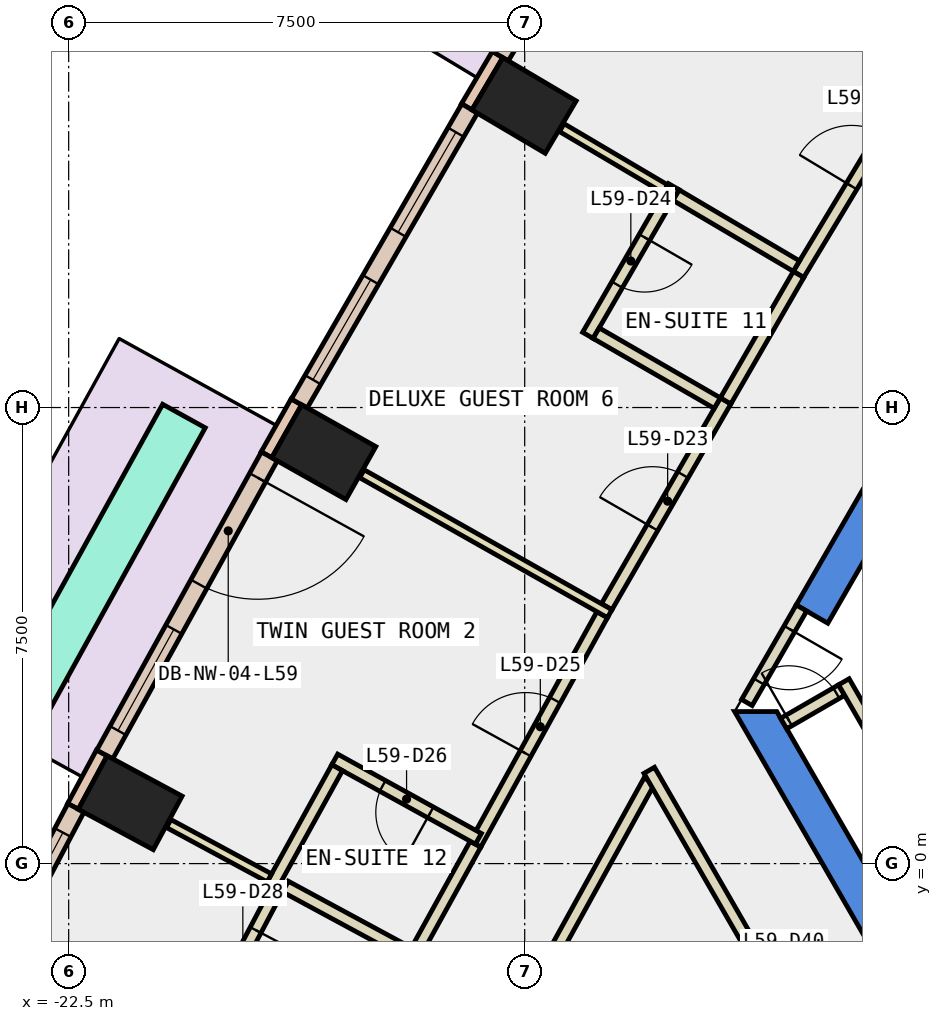
"""IFC4 building model, lengths in metres.
Left out: names, types, materials, properties, quantities, classifications, styles, units other than length and angle.
Written with IfcOpenShell. Run it as: python <this file> out.ifc"""

import sys

from ifc_helpers import new_model, si_unit, direction, frame, frame_2d, origin, origin_2d, place, context, subcontext, project, spatial, polyline, rectangle, outline, extrude, element, fill, save


model = new_model("IFC4")
c1 = context("Model", 3, precision=1e-05, world=origin(), true_north=direction((0.0, 1.0)))
c2 = subcontext(c1, "Body", "Model", "MODEL_VIEW")
j1 = project(units=[si_unit("LENGTHUNIT", "METRE"), si_unit("PLANEANGLEUNIT", "RADIAN")], contexts=[c1])
p1 = place(None, origin())
s1 = spatial("IfcSite", under=j1, at=p1, CompositionType="ELEMENT")
p2 = place(p1, origin())
s2 = spatial("IfcBuilding", under=s1, at=p2, CompositionType="ELEMENT")
p3 = place(p2, frame((0.0, 0.0, 259.4)))
s3 = spatial("IfcBuildingStorey", under=s2, at=p3, CompositionType="ELEMENT", Elevation=259.4)
for number, where, z_axis, x_axis in (
    (1, (-15.011, 12.468, -0.34), (0.0, 0.0, 1.0), (0.509, 0.861, 0.0)),
    (2, (-18.304, 6.766, -0.34), (0.0, 0.0, 1.0), (0.491, 0.871, 0.0)),
    (3, (-21.488, 1.001, -0.34), (0.0, 0.0, 1.0), (0.474, 0.881, 0.0)),
):
    element("IfcColumn", number, at=place(p3, frame(where, z_axis=z_axis, x_axis=x_axis)), inside=s3, PredefinedType="COLUMN", context=c2, shape_type="SweptSolid", body=[
        extrude(rectangle(XDim=1.0, YDim=1.4, at=origin_2d()), origin(), (0.0, 0.0, 1.0), 3.6),
    ])
p4 = place(p3, frame((0.0, 0.0, -0.34)))
e4 = element("IfcWall", 4, at=p4, inside=s3, PredefinedType="SHEAR", context=c2, shape_type="SweptSolid", body=[
    extrude(outline(polyline([(-10.535, 4.253), (-10.015, 3.953), (-5.427, 11.9), (-5.774, 12.5), (-10.535, 4.253)])), origin(), (0.0, 0.0, 1.0), 3.6),
])
p5 = place(p3, frame((0.0, 0.0, -0.34)))
e5 = element("IfcWall", 5, at=p5, inside=s3, PredefinedType="SHEAR", context=c2, shape_type="SweptSolid", body=[
    extrude(outline(polyline([(-11.547, 2.5), (-5.774, -7.5), (-5.427, -6.9), (-10.854, 2.5), (-11.547, 2.5)])), origin(), (0.0, 0.0, 1.0), 3.6),
])
p6 = place(p3, frame((-15.446, 13.306, 0.0), z_axis=(0.0, 0.0, 1.0), x_axis=(-0.508268432768, -0.861198699634, 0.0)))
e6 = element("IfcWall", 6, at=p6, inside=s3, PredefinedType="STANDARD", context=c2, shape_type="SweptSolid", body=[
    extrude(rectangle(XDim=1.0, YDim=0.2, at=frame_2d((0.5, 0.0))), origin(), (0.0, 0.0, 1.0), 3.26),
])
for number, where, z_axis, x_axis in (
    (7, (-18.755, 7.594, 0.0), (0.0, 0.0, 1.0), (-0.492, -0.871, 0.0)),
    (8, (-21.955, 1.821, 0.0), (0.0, 0.0, 1.0), (-0.474, -0.881, 0.0)),
):
    element("IfcWall", number, at=place(p3, frame(where, z_axis=z_axis, x_axis=x_axis)), inside=s3, PredefinedType="STANDARD", context=c2, shape_type="SweptSolid", body=[
        extrude(rectangle(XDim=1.0, YDim=0.2, at=frame_2d((0.5, 0.0))), origin(), (0.0, 0.0, 1.0), 3.26),
    ])
p7 = place(p3, frame((-12.506, 18.076, 0.0), z_axis=(0.0, 0.0, 1.0), x_axis=(-0.516269519619, -0.856426169096, 0.0)))
e9 = element("IfcWall", 9, at=p7, inside=s3, PredefinedType="STANDARD", context=c2, shape_type="SweptSolid", body=[
    extrude(rectangle(XDim=5.603, YDim=0.3, at=frame_2d((2.802, 0.0))), origin(), (0.0, 0.0, 1.0), 3.26),
])
p8 = place(p7, frame((0.401, 0.0, 0.0)))
e10 = element("IfcOpeningElement", 10, at=p8, cuts=e9, PredefinedType="OPENING", context=c2, shape_type="SweptSolid", body=[
    extrude(rectangle(XDim=2.0, YDim=2.4, at=frame_2d((1.0, 1.2))), frame((0.0, 0.16, 0.0), z_axis=(0.0, -1.0, 0.0), x_axis=(1.0, 0.0, 0.0)), (0.0, 0.0, 1.0), 0.32),
])
p9 = place(p7, frame((3.253, 0.0, 0.9)))
e11 = element("IfcOpeningElement", 11, at=p9, cuts=e9, PredefinedType="OPENING", context=c2, shape_type="SweptSolid", body=[
    extrude(rectangle(XDim=1.9, YDim=2.0, at=frame_2d((0.95, 1.0))), frame((0.0, 0.16, 0.0), z_axis=(0.0, -1.0, 0.0), x_axis=(1.0, 0.0, 0.0)), (0.0, 0.0, 1.0), 0.32),
])
p10 = place(p3, frame((-15.906, 12.418, 0.0), z_axis=(0.0, 0.0, 1.0), x_axis=(-0.500089564757, -0.865973687372, 0.0)))
e12 = element("IfcWall", 12, at=p10, inside=s3, PredefinedType="STANDARD", context=c2, shape_type="SweptSolid", body=[
    extrude(rectangle(XDim=5.603, YDim=0.3, at=frame_2d((2.802, 0.0))), origin(), (0.0, 0.0, 1.0), 3.26),
])
p11 = place(p10, frame((0.451, 0.0, 0.9)))
e13 = element("IfcOpeningElement", 13, at=p11, cuts=e12, PredefinedType="OPENING", context=c2, shape_type="SweptSolid", body=[
    extrude(rectangle(XDim=1.9, YDim=2.0, at=frame_2d((0.95, 1.0))), frame((0.0, 0.16, 0.0), z_axis=(0.0, -1.0, 0.0), x_axis=(1.0, 0.0, 0.0)), (0.0, 0.0, 1.0), 0.32),
])
p12 = place(p10, frame((3.252, 0.0, 0.9)))
e14 = element("IfcOpeningElement", 14, at=p12, cuts=e12, PredefinedType="OPENING", context=c2, shape_type="SweptSolid", body=[
    extrude(rectangle(XDim=1.9, YDim=2.0, at=frame_2d((0.95, 1.0))), frame((0.0, 0.16, 0.0), z_axis=(0.0, -1.0, 0.0), x_axis=(1.0, 0.0, 0.0)), (0.0, 0.0, 1.0), 0.32),
])
p13 = place(p3, frame((-19.199, 6.697, 0.0), z_axis=(0.0, 0.0, 1.0), x_axis=(-0.483469062695, -0.875361448441, 0.0)))
e15 = element("IfcWall", 15, at=p13, inside=s3, PredefinedType="STANDARD", context=c2, shape_type="SweptSolid", body=[
    extrude(rectangle(XDim=5.601, YDim=0.3, at=frame_2d((2.801, 0.0))), origin(), (0.0, 0.0, 1.0), 3.26),
])
p14 = place(p13, frame((0.4, 0.0, 0.0)))
e16 = element("IfcOpeningElement", 16, at=p14, cuts=e15, PredefinedType="OPENING", context=c2, shape_type="SweptSolid", body=[
    extrude(rectangle(XDim=2.0, YDim=2.4, at=frame_2d((1.0, 1.2))), frame((0.0, 0.16, 0.0), z_axis=(0.0, -1.0, 0.0), x_axis=(1.0, 0.0, 0.0)), (0.0, 0.0, 1.0), 0.32),
])
p15 = place(p13, frame((3.251, 0.0, 0.9)))
e17 = element("IfcOpeningElement", 17, at=p15, cuts=e15, PredefinedType="OPENING", context=c2, shape_type="SweptSolid", body=[
    extrude(rectangle(XDim=1.9, YDim=2.0, at=frame_2d((0.95, 1.0))), frame((0.0, 0.16, 0.0), z_axis=(0.0, -1.0, 0.0), x_axis=(1.0, 0.0, 0.0)), (0.0, 0.0, 1.0), 0.32),
])
p16 = place(p3, frame((-22.381, 0.916, 0.0), z_axis=(0.0, 0.0, 1.0), x_axis=(-0.466663589714, -0.884434900959, 0.0)))
e18 = element("IfcWall", 18, at=p16, inside=s3, PredefinedType="STANDARD", context=c2, shape_type="SweptSolid", body=[
    extrude(rectangle(XDim=5.638, YDim=0.3, at=frame_2d((2.819, 0.0))), origin(), (0.0, 0.0, 1.0), 3.26),
])
p17 = place(p16, frame((0.459, 0.0, 0.9)))
e19 = element("IfcOpeningElement", 19, at=p17, cuts=e18, PredefinedType="OPENING", context=c2, shape_type="SweptSolid", body=[
    extrude(rectangle(XDim=1.9, YDim=2.0, at=frame_2d((0.95, 1.0))), frame((0.0, 0.16, 0.0), z_axis=(0.0, -1.0, 0.0), x_axis=(1.0, 0.0, 0.0)), (0.0, 0.0, 1.0), 0.32),
])
p18 = place(p16, frame((3.278, 0.0, 0.9)))
e20 = element("IfcOpeningElement", 20, at=p18, cuts=e18, PredefinedType="OPENING", context=c2, shape_type="SweptSolid", body=[
    extrude(rectangle(XDim=1.9, YDim=2.0, at=frame_2d((0.95, 1.0))), frame((0.0, 0.16, 0.0), z_axis=(0.0, -1.0, 0.0), x_axis=(1.0, 0.0, 0.0)), (0.0, 0.0, 1.0), 0.32),
])
p19 = place(p3, frame((-20.604, 7.36, 0.0), z_axis=(0.0, 0.0, 1.0), x_axis=(-0.483262482812, -0.87547551234, 0.0)))
e21 = element("IfcWall", 21, at=p19, inside=s3, PredefinedType="STANDARD", context=c2, shape_type="SweptSolid", body=[
    extrude(rectangle(XDim=5.403, YDim=0.8, at=frame_2d((2.702, 0.0))), origin(), (0.0, 0.0, 1.0), 0.8),
])
p20 = place(p3, frame((-12.95, 1.36, 0.0), z_axis=(0.0, 0.0, 1.0), x_axis=(-0.483418231124, -0.875389521194, 0.0)))
e22 = element("IfcWall", 22, at=p20, inside=s3, PredefinedType="PARTITIONING", context=c2, shape_type="SweptSolid", body=[
    extrude(rectangle(XDim=4.373, YDim=0.2, at=frame_2d((2.187, 0.0))), origin(), (0.0, 0.0, 1.0), 3.26),
])
p21 = place(p3, frame((-10.498, 9.689, 0.0), z_axis=(0.0, 0.0, 1.0), x_axis=(0.516353342298, 0.856375633643, 0.0)))
e23 = element("IfcWall", 23, at=p21, inside=s3, PredefinedType="PARTITIONING", context=c2, shape_type="SweptSolid", body=[
    extrude(rectangle(XDim=4.288, YDim=0.2, at=frame_2d((2.144, 0.0))), origin(), (0.0, 0.0, 1.0), 3.26),
])
p22 = place(p21, frame((1.694, 0.0, 0.0)))
e24 = element("IfcOpeningElement", 24, at=p22, cuts=e23, PredefinedType="OPENING", context=c2, shape_type="SweptSolid", body=[
    extrude(rectangle(XDim=1.0, YDim=2.1, at=frame_2d((0.5, 1.05))), frame((0.0, 0.11, 0.0), z_axis=(0.0, -1.0, 0.0), x_axis=(1.0, 0.0, 0.0)), (0.0, 0.0, 1.0), 0.22),
])
p23 = place(p3, frame((-13.652, 4.224, 0.0), z_axis=(0.0, 0.0, 1.0), x_axis=(0.500221427001, 0.865897525097, 0.0)))
e25 = element("IfcWall", 25, at=p23, inside=s3, PredefinedType="PARTITIONING", context=c2, shape_type="SweptSolid", body=[
    extrude(rectangle(XDim=3.91, YDim=0.2, at=frame_2d((1.955, 0.0))), origin(), (0.0, 0.0, 1.0), 3.26),
])
p24 = place(p23, frame((1.505, 0.0, 0.0)))
e26 = element("IfcOpeningElement", 26, at=p24, cuts=e25, PredefinedType="OPENING", context=c2, shape_type="SweptSolid", body=[
    extrude(rectangle(XDim=1.0, YDim=2.1, at=frame_2d((0.5, 1.05))), frame((0.0, 0.11, 0.0), z_axis=(0.0, -1.0, 0.0), x_axis=(1.0, 0.0, 0.0)), (0.0, 0.0, 1.0), 0.22),
])
p25 = place(p3, frame((-11.696, 7.61, 0.0), z_axis=(0.0, 0.0, 1.0), x_axis=(0.500089422704, 0.865973769406, 0.0)))
e27 = element("IfcWall", 27, at=p25, inside=s3, PredefinedType="PARTITIONING", context=c2, shape_type="SweptSolid", body=[
    extrude(rectangle(XDim=2.399, YDim=0.2, at=frame_2d((1.2, 0.0))), origin(), (0.0, 0.0, 1.0), 3.26),
])
p26 = place(p3, frame((-15.809, 0.32, 0.0), z_axis=(0.0, 0.0, 1.0), x_axis=(0.483322920175, 0.875442148193, 0.0)))
e28 = element("IfcWall", 28, at=p26, inside=s3, PredefinedType="PARTITIONING", context=c2, shape_type="SweptSolid", body=[
    extrude(rectangle(XDim=4.31, YDim=0.2, at=frame_2d((2.155, 0.0))), origin(), (0.0, 0.0, 1.0), 3.26),
])
p27 = place(p26, frame((1.705, 0.0, 0.0)))
e29 = element("IfcOpeningElement", 29, at=p27, cuts=e28, PredefinedType="OPENING", context=c2, shape_type="SweptSolid", body=[
    extrude(rectangle(XDim=1.0, YDim=2.1, at=frame_2d((0.5, 1.05))), frame((0.0, 0.11, 0.0), z_axis=(0.0, -1.0, 0.0), x_axis=(1.0, 0.0, 0.0)), (0.0, 0.0, 1.0), 0.22),
])
p28 = place(p3, frame((-16.776, -1.43, 0.0), z_axis=(0.0, 0.0, 1.0), x_axis=(0.48360724937, 0.87528511261, 0.0)))
e30 = element("IfcWall", 30, at=p28, inside=s3, PredefinedType="PARTITIONING", context=c2, shape_type="SweptSolid", body=[
    extrude(rectangle(XDim=1.997, YDim=0.2, at=frame_2d((0.999, 0.0))), origin(), (0.0, 0.0, 1.0), 3.26),
])
p29 = place(p3, frame((-10.741, 2.303, 0.0), z_axis=(0.0, 0.0, 1.0), x_axis=(0.866063652425, 0.499933745558, 0.0)))
e31 = element("IfcWall", 31, at=p29, inside=s3, PredefinedType="PARTITIONING", context=c2, shape_type="SweptSolid", body=[
    extrude(rectangle(XDim=1.1, YDim=0.2, at=frame_2d((0.55, 0.0))), origin(), (0.0, 0.0, 1.0), 3.26),
])
p30 = place(p29, frame((0.1, 0.0, 0.0)))
e32 = element("IfcOpeningElement", 32, at=p30, cuts=e31, PredefinedType="OPENING", context=c2, shape_type="SweptSolid", body=[
    extrude(rectangle(XDim=0.9, YDim=2.1, at=frame_2d((0.45, 1.05))), frame((0.0, 0.11, 0.0), z_axis=(0.0, -1.0, 0.0), x_axis=(1.0, 0.0, 0.0)), (0.0, 0.0, 1.0), 0.22),
])
p31 = place(p3, frame((-9.751, 2.99, 0.0), z_axis=(0.0, 0.0, 1.0), x_axis=(0.499955951776, -0.866050833545, 0.0)))
e33 = element("IfcWall", 33, at=p31, inside=s3, PredefinedType="PARTITIONING", context=c2, shape_type="SweptSolid", body=[
    extrude(rectangle(XDim=5.4, YDim=0.2, at=frame_2d((2.7, 0.0))), origin(), (0.0, 0.0, 1.0), 3.26),
])
p32 = place(p3, frame((-10.306, 14.463, 0.0), z_axis=(0.0, 0.0, 1.0), x_axis=(0.856338986581, -0.51641411683, 0.0)))
e34 = element("IfcWall", 34, at=p32, inside=s3, PredefinedType="PARTITIONING", context=c2, shape_type="SweptSolid", body=[
    extrude(rectangle(XDim=2.301, YDim=0.2, at=frame_2d((1.15, 0.0))), origin(), (0.0, 0.0, 1.0), 3.26),
])
p33 = place(p3, frame((-12.685, 11.096, 0.0), z_axis=(0.0, 0.0, 1.0), x_axis=(-0.861157054724, 0.508338988371, 0.0)))
e35 = element("IfcWall", 35, at=p33, inside=s3, PredefinedType="PARTITIONING", context=c2, shape_type="SweptSolid", body=[
    extrude(rectangle(XDim=1.981, YDim=0.15, at=frame_2d((0.991, 0.0))), origin(), (0.0, 0.0, 1.0), 3.26),
])
p34 = place(p3, frame((-10.532, 9.826, 0.0), z_axis=(0.0, 0.0, 1.0), x_axis=(-0.861311086958, 0.508077958077, 0.0)))
e36 = element("IfcWall", 36, at=p34, inside=s3, PredefinedType="PARTITIONING", context=c2, shape_type="SweptSolid", body=[
    extrude(rectangle(XDim=2.299, YDim=0.2, at=frame_2d((1.149, 0.0))), origin(), (0.0, 0.0, 1.0), 3.26),
])
p35 = place(p3, frame((-12.548, 11.132, 0.0), z_axis=(0.0, 0.0, 1.0), x_axis=(-0.500313606915, -0.865844267022, 0.0)))
e37 = element("IfcWall", 37, at=p35, inside=s3, PredefinedType="PARTITIONING", context=c2, shape_type="SweptSolid", body=[
    extrude(rectangle(XDim=2.824, YDim=0.2, at=frame_2d((1.412, 0.0))), origin(), (0.0, 0.0, 1.0), 3.26),
])
p36 = place(p35, frame((0.962, 0.0, 0.0)))
e38 = element("IfcOpeningElement", 38, at=p36, cuts=e37, PredefinedType="OPENING", context=c2, shape_type="SweptSolid", body=[
    extrude(rectangle(XDim=0.9, YDim=2.1, at=frame_2d((0.45, 1.05))), frame((0.0, 0.11, 0.0), z_axis=(0.0, -1.0, 0.0), x_axis=(1.0, 0.0, 0.0)), (0.0, 0.0, 1.0), 0.22),
])
p37 = place(p3, frame((-13.825, 8.723, 0.0), z_axis=(0.0, 0.0, 1.0), x_axis=(0.866053019151, -0.499952165731, 0.0)))
e39 = element("IfcWall", 39, at=p37, inside=s3, PredefinedType="PARTITIONING", context=c2, shape_type="SweptSolid", body=[
    extrude(rectangle(XDim=2.3, YDim=0.2, at=frame_2d((1.15, 0.0))), origin(), (0.0, 0.0, 1.0), 3.26),
])
p38 = place(p3, frame((-13.602, 4.11, 0.0), z_axis=(0.0, 0.0, 1.0), x_axis=(-0.870787203306, 0.491660092502, 0.0)))
e40 = element("IfcWall", 40, at=p38, inside=s3, PredefinedType="PARTITIONING", context=c2, shape_type="SweptSolid", body=[
    extrude(rectangle(XDim=4.68, YDim=0.15, at=frame_2d((2.34, 0.0))), origin(), (0.0, 0.0, 1.0), 3.26),
])
p39 = place(p3, frame((-15.761, 0.408, 0.0), z_axis=(0.0, 0.0, 1.0), x_axis=(-0.875391622802, 0.483414425445, 0.0)))
e41 = element("IfcWall", 41, at=p39, inside=s3, PredefinedType="PARTITIONING", context=c2, shape_type="SweptSolid", body=[
    extrude(rectangle(XDim=2.699, YDim=0.2, at=frame_2d((1.35, 0.0))), origin(), (0.0, 0.0, 1.0), 3.26),
])
p40 = place(p39, frame((0.9, 0.0, 0.0)))
e42 = element("IfcOpeningElement", 42, at=p40, cuts=e41, PredefinedType="OPENING", context=c2, shape_type="SweptSolid", body=[
    extrude(rectangle(XDim=0.9, YDim=2.1, at=frame_2d((0.45, 1.05))), frame((0.0, 0.11, 0.0), z_axis=(0.0, -1.0, 0.0), x_axis=(1.0, 0.0, 0.0)), (0.0, 0.0, 1.0), 0.22),
])
p41 = place(p3, frame((-18.085, 1.577, 0.0), z_axis=(0.0, 0.0, 1.0), x_axis=(-0.483329790342, -0.875438355207, 0.0)))
e43 = element("IfcWall", 43, at=p41, inside=s3, PredefinedType="PARTITIONING", context=c2, shape_type="SweptSolid", body=[
    extrude(rectangle(XDim=2.224, YDim=0.2, at=frame_2d((1.112, 0.0))), origin(), (0.0, 0.0, 1.0), 3.26),
])
p42 = place(p3, frame((-19.199, -0.235, 0.0), z_axis=(0.0, 0.0, 1.0), x_axis=(-0.880166754904, 0.474664601126, 0.0)))
e44 = element("IfcWall", 44, at=p42, inside=s3, PredefinedType="PARTITIONING", context=c2, shape_type="SweptSolid", body=[
    extrude(rectangle(XDim=1.881, YDim=0.15, at=frame_2d((0.941, 0.0))), origin(), (0.0, 0.0, 1.0), 3.26),
])
p43 = place(p3, frame((-16.824, -1.518, 0.0), z_axis=(0.0, 0.0, 1.0), x_axis=(-0.879879019938, 0.47519775912, 0.0)))
e45 = element("IfcWall", 45, at=p43, inside=s3, PredefinedType="PARTITIONING", context=c2, shape_type="SweptSolid", body=[
    extrude(rectangle(XDim=2.399, YDim=0.2, at=frame_2d((1.2, 0.0))), origin(), (0.0, 0.0, 1.0), 3.26),
])
p44 = place(p3, frame((-19.069, -0.418, 0.0), z_axis=(0.0, 0.0, 1.0), x_axis=(-0.467007153784, -0.884253537349, 0.0)))
e46 = element("IfcWall", 46, at=p44, inside=s3, PredefinedType="PARTITIONING", context=c2, shape_type="SweptSolid", body=[
    extrude(rectangle(XDim=2.625, YDim=0.2, at=frame_2d((1.312, 0.0))), origin(), (0.0, 0.0, 1.0), 3.26),
])
p45 = place(p44, frame((0.763, 0.0, 0.0)))
e47 = element("IfcOpeningElement", 47, at=p45, cuts=e46, PredefinedType="OPENING", context=c2, shape_type="SweptSolid", body=[
    extrude(rectangle(XDim=0.9, YDim=2.1, at=frame_2d((0.45, 1.05))), frame((0.0, 0.11, 0.0), z_axis=(0.0, -1.0, 0.0), x_axis=(1.0, 0.0, 0.0)), (0.0, 0.0, 1.0), 0.22),
])
p46 = place(p3, frame((-10.449, 4.203, 0.0), z_axis=(0.0, 0.0, 1.0), x_axis=(-0.499914839587, -0.866074565589, 0.0)))
e48 = element("IfcWall", 48, at=p46, inside=s3, PredefinedType="PARTITIONING", context=c2, shape_type="SweptSolid", body=[
    extrude(rectangle(XDim=1.794, YDim=0.2, at=frame_2d((0.897, 0.0))), origin(), (0.0, 0.0, 1.0), 2.4),
])
p47 = place(p46, frame((0.397, 0.0, 0.0)))
e49 = element("IfcOpeningElement", 49, at=p47, cuts=e48, PredefinedType="OPENING", context=c2, shape_type="SweptSolid", body=[
    extrude(rectangle(XDim=1.0, YDim=2.1, at=frame_2d((0.5, 1.05))), frame((0.0, 0.11, 0.0), z_axis=(0.0, -1.0, 0.0), x_axis=(1.0, 0.0, 0.0)), (0.0, 0.0, 1.0), 0.22),
])
p48 = place(p3, frame((-9.25, -4.879, 0.0), z_axis=(0.0, 0.0, 1.0), x_axis=(-0.499944124422, 0.866057661161, 0.0)))
e50 = element("IfcWall", 50, at=p48, inside=s3, PredefinedType="PARTITIONING", context=c2, shape_type="SweptSolid", body=[
    extrude(rectangle(XDim=7.405, YDim=0.2, at=frame_2d((3.702, 0.0))), origin(), (0.0, 0.0, 1.0), 3.26),
])
p49 = place(p48, frame((2.533, 0.0, 0.0)))
e51 = element("IfcOpeningElement", 51, at=p49, cuts=e50, PredefinedType="OPENING", context=c2, shape_type="SweptSolid", body=[
    extrude(rectangle(XDim=0.9, YDim=2.1, at=frame_2d((0.45, 1.05))), frame((0.0, 0.11, 0.0), z_axis=(0.0, -1.0, 0.0), x_axis=(1.0, 0.0, 0.0)), (0.0, 0.0, 1.0), 0.22),
])
p50 = place(p11, origin())
e52 = element("IfcWindow", 52, at=p50, inside=s3, PartitioningType="SINGLE_PANEL", PredefinedType="WINDOW", context=c2, shape_type="SweptSolid", body=[
    extrude(rectangle(XDim=1.9, YDim=2.0, at=frame_2d((0.95, 1.0))), frame((0.0, 0.03, 0.0), z_axis=(0.0, -1.0, 0.0), x_axis=(1.0, 0.0, 0.0)), (0.0, 0.0, 1.0), 0.06),
])
fill(e13, e52)
p51 = place(p12, origin())
e53 = element("IfcWindow", 53, at=p51, inside=s3, PartitioningType="SINGLE_PANEL", PredefinedType="WINDOW", context=c2, shape_type="SweptSolid", body=[
    extrude(rectangle(XDim=1.9, YDim=2.0, at=frame_2d((0.95, 1.0))), frame((0.0, 0.03, 0.0), z_axis=(0.0, -1.0, 0.0), x_axis=(1.0, 0.0, 0.0)), (0.0, 0.0, 1.0), 0.06),
])
fill(e14, e53)
p52 = place(p14, origin())
e54 = element("IfcDoor", 54, at=p52, inside=s3, OperationType="SLIDING_TO_LEFT", PredefinedType="DOOR", context=c2, shape_type="SweptSolid", body=[
    extrude(rectangle(XDim=2.0, YDim=2.4, at=frame_2d((1.0, 1.2))), frame((0.0, 0.025, 0.0), z_axis=(0.0, -1.0, 0.0), x_axis=(1.0, 0.0, 0.0)), (0.0, 0.0, 1.0), 0.05),
])
fill(e16, e54)
p53 = place(p15, origin())
e55 = element("IfcWindow", 55, at=p53, inside=s3, PartitioningType="SINGLE_PANEL", PredefinedType="WINDOW", context=c2, shape_type="SweptSolid", body=[
    extrude(rectangle(XDim=1.9, YDim=2.0, at=frame_2d((0.95, 1.0))), frame((0.0, 0.03, 0.0), z_axis=(0.0, -1.0, 0.0), x_axis=(1.0, 0.0, 0.0)), (0.0, 0.0, 1.0), 0.06),
])
fill(e17, e55)
p54 = place(p17, origin())
e56 = element("IfcWindow", 56, at=p54, inside=s3, PartitioningType="SINGLE_PANEL", PredefinedType="WINDOW", context=c2, shape_type="SweptSolid", body=[
    extrude(rectangle(XDim=1.9, YDim=2.0, at=frame_2d((0.95, 1.0))), frame((0.0, 0.03, 0.0), z_axis=(0.0, -1.0, 0.0), x_axis=(1.0, 0.0, 0.0)), (0.0, 0.0, 1.0), 0.06),
])
fill(e19, e56)
p55 = place(p22, origin())
e57 = element("IfcDoor", 57, at=p55, inside=s3, OperationType="SINGLE_SWING_RIGHT", PredefinedType="DOOR", context=c2, shape_type="SweptSolid", body=[
    extrude(rectangle(XDim=1.0, YDim=2.1, at=frame_2d((0.5, 1.05))), frame((0.0, 0.025, 0.0), z_axis=(0.0, -1.0, 0.0), x_axis=(1.0, 0.0, 0.0)), (0.0, 0.0, 1.0), 0.05),
])
fill(e24, e57)
p56 = place(p24, origin())
e58 = element("IfcDoor", 58, at=p56, inside=s3, OperationType="SINGLE_SWING_RIGHT", PredefinedType="DOOR", context=c2, shape_type="SweptSolid", body=[
    extrude(rectangle(XDim=1.0, YDim=2.1, at=frame_2d((0.5, 1.05))), frame((0.0, 0.025, 0.0), z_axis=(0.0, -1.0, 0.0), x_axis=(1.0, 0.0, 0.0)), (0.0, 0.0, 1.0), 0.05),
])
fill(e26, e58)
p57 = place(p36, origin())
e59 = element("IfcDoor", 59, at=p57, inside=s3, OperationType="SINGLE_SWING_LEFT", PredefinedType="DOOR", context=c2, shape_type="SweptSolid", body=[
    extrude(rectangle(XDim=0.9, YDim=2.1, at=frame_2d((0.45, 1.05))), frame((0.0, 0.025, 0.0), z_axis=(0.0, -1.0, 0.0), x_axis=(1.0, 0.0, 0.0)), (0.0, 0.0, 1.0), 0.05),
])
fill(e38, e59)
p58 = place(p27, origin())
e60 = element("IfcDoor", 60, at=p58, inside=s3, OperationType="SINGLE_SWING_RIGHT", PredefinedType="DOOR", context=c2, shape_type="SweptSolid", body=[
    extrude(rectangle(XDim=1.0, YDim=2.1, at=frame_2d((0.5, 1.05))), frame((0.0, 0.025, 0.0), z_axis=(0.0, -1.0, 0.0), x_axis=(1.0, 0.0, 0.0)), (0.0, 0.0, 1.0), 0.05),
])
fill(e29, e60)
p59 = place(p40, origin())
e61 = element("IfcDoor", 61, at=p59, inside=s3, OperationType="SINGLE_SWING_LEFT", PredefinedType="DOOR", context=c2, shape_type="SweptSolid", body=[
    extrude(rectangle(XDim=0.9, YDim=2.1, at=frame_2d((0.45, 1.05))), frame((0.0, 0.025, 0.0), z_axis=(0.0, -1.0, 0.0), x_axis=(1.0, 0.0, 0.0)), (0.0, 0.0, 1.0), 0.05),
])
fill(e42, e61)
p60 = place(p45, origin())
e62 = element("IfcDoor", 62, at=p60, inside=s3, OperationType="SINGLE_SWING_LEFT", PredefinedType="DOOR", context=c2, shape_type="SweptSolid", body=[
    extrude(rectangle(XDim=0.9, YDim=2.1, at=frame_2d((0.45, 1.05))), frame((0.0, 0.025, 0.0), z_axis=(0.0, -1.0, 0.0), x_axis=(1.0, 0.0, 0.0)), (0.0, 0.0, 1.0), 0.05),
])
fill(e47, e62)
p61 = place(p30, origin())
e63 = element("IfcDoor", 63, at=p61, inside=s3, OperationType="SINGLE_SWING_RIGHT", PredefinedType="DOOR", context=c2, shape_type="SweptSolid", body=[
    extrude(rectangle(XDim=0.9, YDim=2.1, at=frame_2d((0.45, 1.05))), frame((0.0, 0.025, 0.0), z_axis=(0.0, -1.0, 0.0), x_axis=(1.0, 0.0, 0.0)), (0.0, 0.0, 1.0), 0.05),
])
fill(e32, e63)
p62 = place(p47, origin())
e64 = element("IfcDoor", 64, at=p62, inside=s3, OperationType="SINGLE_SWING_LEFT", PredefinedType="DOOR", context=c2, shape_type="SweptSolid", body=[
    extrude(rectangle(XDim=1.0, YDim=2.1, at=frame_2d((0.5, 1.05))), frame((0.0, 0.025, 0.0), z_axis=(0.0, -1.0, 0.0), x_axis=(1.0, 0.0, 0.0)), (0.0, 0.0, 1.0), 0.05),
])
fill(e49, e64)
save(model, sys.argv[1])
